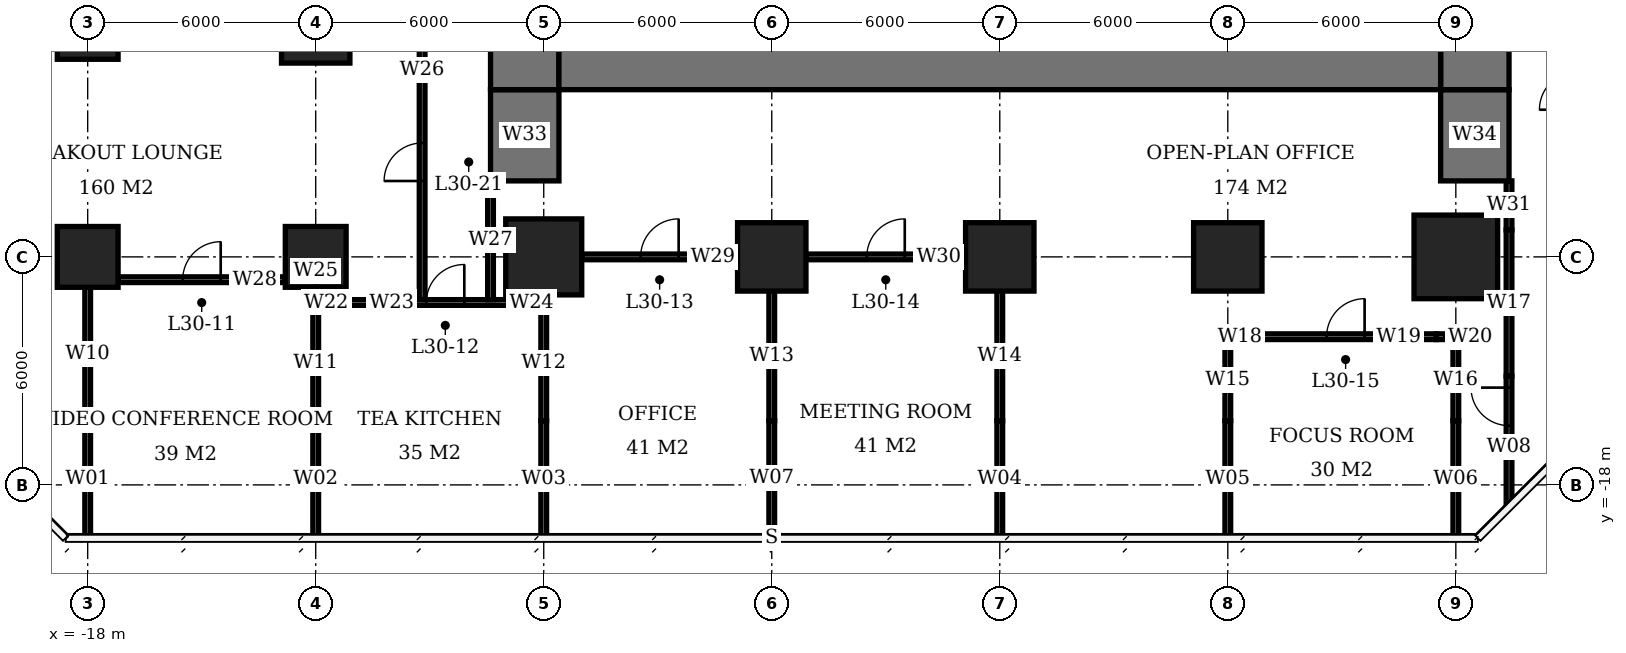
"""IFC4 building model, lengths in metres.
Left out: names, types, materials, properties, quantities, classifications, styles, units other than length and angle.
Written with IfcOpenShell. Run it as: python <this file> out.ifc"""

import sys

from ifc_helpers import new_model, si_unit, direction, frame, frame_2d, origin, origin_2d, place, context, subcontext, project, spatial, rectangle, extrude, element, fill, save


model = new_model("IFC4")
c1 = context("Model", 3, precision=1e-05, world=origin(), true_north=direction((0.0, 1.0)))
c2 = subcontext(c1, "Body", "Model", "MODEL_VIEW")
j1 = project(units=[si_unit("LENGTHUNIT", "METRE"), si_unit("PLANEANGLEUNIT", "RADIAN")], contexts=[c1])
p1 = place(None, origin())
s1 = spatial("IfcSite", under=j1, at=p1, CompositionType="ELEMENT")
p2 = place(p1, origin())
s2 = spatial("IfcBuilding", under=s1, at=p2, CompositionType="ELEMENT")
p3 = place(p2, frame((0.0, 0.0, 125.0)))
s3 = spatial("IfcBuildingStorey", under=s2, at=p3, CompositionType="ELEMENT", Elevation=125.0)
for number, where, z_axis, x_axis in (
    (1, (-18.0, -12.0, 0.0), (0.0, 0.0, 1.0), (1.0, 0.0, 0.0)),
    (2, (-18.0, -6.0, 0.0), (0.0, 0.0, 1.0), (1.0, 0.0, 0.0)),
    (3, (-12.0, -12.0, 0.0), (0.0, 0.0, 1.0), (1.0, 0.0, 0.0)),
):
    element("IfcColumn", number, at=place(p3, frame(where, z_axis=z_axis, x_axis=x_axis)), inside=s3, PredefinedType="COLUMN", context=c2, shape_type="SweptSolid", body=[
        extrude(rectangle(XDim=1.6, YDim=1.6, at=origin_2d()), origin(), (0.0, 0.0, 1.0), 3.9),
    ])
p4 = place(p3, frame((-12.0, -6.0, 0.0), z_axis=(0.0, 0.0, 1.0), x_axis=(1.0, 0.0, 0.0)))
e4 = element("IfcColumn", 4, at=p4, inside=s3, PredefinedType="COLUMN", context=c2, shape_type="SweptSolid", body=[
    extrude(rectangle(XDim=1.8, YDim=1.8, at=origin_2d()), origin(), (0.0, 0.0, 1.0), 3.9),
])
p5 = place(p3, frame((-6.0, -12.0, 0.0), z_axis=(0.0, 0.0, 1.0), x_axis=(1.0, 0.0, 0.0)))
e5 = element("IfcColumn", 5, at=p5, inside=s3, PredefinedType="COLUMN", context=c2, shape_type="SweptSolid", body=[
    extrude(rectangle(XDim=2.0, YDim=2.0, at=origin_2d()), origin(), (0.0, 0.0, 1.0), 3.9),
])
for number, where, z_axis, x_axis in (
    (6, (0.0, -12.0, 0.0), (0.0, 0.0, 1.0), (1.0, 0.0, 0.0)),
    (7, (6.0, -12.0, 0.0), (0.0, 0.0, 1.0), (1.0, 0.0, 0.0)),
    (8, (12.0, -12.0, 0.0), (0.0, 0.0, 1.0), (1.0, 0.0, 0.0)),
):
    element("IfcColumn", number, at=place(p3, frame(where, z_axis=z_axis, x_axis=x_axis)), inside=s3, PredefinedType="COLUMN", context=c2, shape_type="SweptSolid", body=[
        extrude(rectangle(XDim=1.8, YDim=1.8, at=origin_2d()), origin(), (0.0, 0.0, 1.0), 3.9),
    ])
p6 = place(p3, frame((18.0, -12.0, 0.0), z_axis=(0.0, 0.0, 1.0), x_axis=(1.0, 0.0, 0.0)))
e9 = element("IfcColumn", 9, at=p6, inside=s3, PredefinedType="COLUMN", context=c2, shape_type="SweptSolid", body=[
    extrude(rectangle(XDim=2.2, YDim=2.2, at=origin_2d()), origin(), (0.0, 0.0, 1.0), 3.9),
])
p7 = place(p3, frame((-5.6, -6.6, 0.0), z_axis=(0.0, 0.0, 1.0), x_axis=(1.0, 0.0, 0.0)))
e10 = element("IfcWall", 10, at=p7, inside=s3, PredefinedType="SHEAR", context=c2, shape_type="SweptSolid", body=[
    extrude(rectangle(XDim=23.2, YDim=2.0, at=frame_2d((11.6, 0.0))), origin(), (0.0, 0.0, 1.0), 3.9),
])
p8 = place(p3, frame((-6.5, -7.6, 0.0), z_axis=(0.0, 0.0, 1.0), x_axis=(0.0, 1.0, 0.0)))
e11 = element("IfcWall", 11, at=p8, inside=s3, PredefinedType="SHEAR", context=c2, shape_type="SweptSolid", body=[
    extrude(rectangle(XDim=21.2, YDim=1.8, at=frame_2d((10.6, 0.0))), origin(), (0.0, 0.0, 1.0), 3.9),
])
p9 = place(p8, frame((7.8, 0.0, 0.0)))
e12 = element("IfcOpeningElement", 12, at=p9, cuts=e11, PredefinedType="OPENING", context=c2, shape_type="SweptSolid", body=[
    extrude(rectangle(XDim=1.8, YDim=2.4, at=frame_2d((0.9, 1.2))), frame((0.0, 0.91, 0.0), z_axis=(0.0, -1.0, 0.0), x_axis=(1.0, 0.0, 0.0)), (0.0, 0.0, 1.0), 1.82),
])
p10 = place(p3, frame((18.5, -7.6, 0.0), z_axis=(0.0, 0.0, 1.0), x_axis=(0.0, 1.0, 0.0)))
e13 = element("IfcWall", 13, at=p10, inside=s3, PredefinedType="SHEAR", context=c2, shape_type="SweptSolid", body=[
    extrude(rectangle(XDim=21.2, YDim=1.8, at=frame_2d((10.6, 0.0))), origin(), (0.0, 0.0, 1.0), 3.9),
])
p11 = place(p10, frame((9.2, 0.0, 0.0)))
e14 = element("IfcOpeningElement", 14, at=p11, cuts=e13, PredefinedType="OPENING", context=c2, shape_type="SweptSolid", body=[
    extrude(rectangle(XDim=1.8, YDim=2.4, at=frame_2d((0.9, 1.2))), frame((0.0, 0.91, 0.0), z_axis=(0.0, -1.0, 0.0), x_axis=(1.0, 0.0, 0.0)), (0.0, 0.0, 1.0), 1.82),
])
for number, where, z_axis, x_axis in (
    (15, (-6.5, -10.0, 0.0), (0.0, 0.0, 1.0), (0.0, 1.0, 0.0)),
    (16, (18.5, -10.0, 0.0), (0.0, 0.0, 1.0), (0.0, 1.0, 0.0)),
):
    element("IfcWall", number, at=place(p3, frame(where, z_axis=z_axis, x_axis=x_axis)), inside=s3, PredefinedType="SHEAR", context=c2, shape_type="SweptSolid", body=[
        extrude(rectangle(XDim=2.4, YDim=1.8, at=frame_2d((1.2, 0.0))), origin(), (0.0, 0.0, 1.0), 3.9),
    ])
p12 = place(p3, frame((11.925, -14.1, 0.0), z_axis=(0.0, 0.0, 1.0), x_axis=(1.0, 0.0, 0.0)))
e17 = element("IfcWall", 17, at=p12, inside=s3, PredefinedType="PARTITIONING", context=c2, shape_type="SweptSolid", body=[
    extrude(rectangle(XDim=0.785, YDim=0.15, at=frame_2d((0.393, 0.0))), origin(), (0.0, 0.0, 1.0), 2.65),
])
p13 = place(p3, frame((12.71, -14.1, 0.0), z_axis=(0.0, 0.0, 1.0), x_axis=(1.0, 0.0, 0.0)))
e18 = element("IfcWall", 18, at=p13, inside=s3, PredefinedType="PARTITIONING", context=c2, shape_type="SweptSolid", body=[
    extrude(rectangle(XDim=4.78, YDim=0.15, at=frame_2d((2.39, 0.0))), origin(), (0.0, 0.0, 1.0), 3.65),
])
p14 = place(p13, frame((1.89, 0.0, 0.0)))
e19 = element("IfcOpeningElement", 19, at=p14, cuts=e18, PredefinedType="OPENING", context=c2, shape_type="SweptSolid", body=[
    extrude(rectangle(XDim=1.0, YDim=2.1, at=frame_2d((0.5, 1.05))), frame((0.0, 0.085, 0.0), z_axis=(0.0, -1.0, 0.0), x_axis=(1.0, 0.0, 0.0)), (0.0, 0.0, 1.0), 0.17),
])
p15 = place(p3, frame((17.49, -14.1, 0.0), z_axis=(0.0, 0.0, 1.0), x_axis=(1.0, 0.0, 0.0)))
e20 = element("IfcWall", 20, at=p15, inside=s3, PredefinedType="PARTITIONING", context=c2, shape_type="SweptSolid", body=[
    extrude(rectangle(XDim=0.585, YDim=0.15, at=frame_2d((0.292, 0.0))), origin(), (0.0, 0.0, 1.0), 2.65),
])
p16 = place(p3, frame((-12.15, -13.2, 0.0), z_axis=(0.0, 0.0, 1.0), x_axis=(1.0, 0.0, 0.0)))
e21 = element("IfcWall", 21, at=p16, inside=s3, PredefinedType="PARTITIONING", context=c2, shape_type="SweptSolid", body=[
    extrude(rectangle(XDim=0.86, YDim=0.15, at=frame_2d((0.43, 0.0))), origin(), (0.0, 0.0, 1.0), 2.65),
])
p17 = place(p3, frame((-11.29, -13.2, 0.0), z_axis=(0.0, 0.0, 1.0), x_axis=(1.0, 0.0, 0.0)))
e22 = element("IfcWall", 22, at=p17, inside=s3, PredefinedType="PARTITIONING", context=c2, shape_type="SweptSolid", body=[
    extrude(rectangle(XDim=4.58, YDim=0.15, at=frame_2d((2.29, 0.0))), origin(), (0.0, 0.0, 1.0), 3.65),
])
p18 = place(p17, frame((2.2, 0.0, 0.0)))
e23 = element("IfcOpeningElement", 23, at=p18, cuts=e22, PredefinedType="OPENING", context=c2, shape_type="SweptSolid", body=[
    extrude(rectangle(XDim=1.0, YDim=2.1, at=frame_2d((0.5, 1.05))), frame((0.0, 0.085, 0.0), z_axis=(0.0, -1.0, 0.0), x_axis=(1.0, 0.0, 0.0)), (0.0, 0.0, 1.0), 0.17),
])
p19 = place(p3, frame((-6.71, -13.2, 0.0), z_axis=(0.0, 0.0, 1.0), x_axis=(1.0, 0.0, 0.0)))
e24 = element("IfcWall", 24, at=p19, inside=s3, PredefinedType="PARTITIONING", context=c2, shape_type="SweptSolid", body=[
    extrude(rectangle(XDim=0.785, YDim=0.15, at=frame_2d((0.393, 0.0))), origin(), (0.0, 0.0, 1.0), 2.65),
])
p20 = place(p3, frame((-17.2, -12.6, 0.0), z_axis=(0.0, 0.0, 1.0), x_axis=(1.0, 0.0, 0.0)))
e25 = element("IfcWall", 25, at=p20, inside=s3, PredefinedType="PARTITIONING", context=c2, shape_type="SweptSolid", body=[
    extrude(rectangle(XDim=4.4, YDim=0.15, at=frame_2d((2.2, 0.0))), origin(), (0.0, 0.0, 1.0), 3.65),
])
p21 = place(p20, frame((1.7, 0.0, 0.0)))
e26 = element("IfcOpeningElement", 26, at=p21, cuts=e25, PredefinedType="OPENING", context=c2, shape_type="SweptSolid", body=[
    extrude(rectangle(XDim=1.0, YDim=2.1, at=frame_2d((0.5, 1.05))), frame((0.0, 0.085, 0.0), z_axis=(0.0, -1.0, 0.0), x_axis=(1.0, 0.0, 0.0)), (0.0, 0.0, 1.0), 0.17),
])
p22 = place(p3, frame((-5.0, -12.0, 0.0), z_axis=(0.0, 0.0, 1.0), x_axis=(1.0, 0.0, 0.0)))
e27 = element("IfcWall", 27, at=p22, inside=s3, PredefinedType="PARTITIONING", context=c2, shape_type="SweptSolid", body=[
    extrude(rectangle(XDim=4.1, YDim=0.15, at=frame_2d((2.05, 0.0))), origin(), (0.0, 0.0, 1.0), 3.65),
])
p23 = place(p22, frame((1.55, 0.0, 0.0)))
e28 = element("IfcOpeningElement", 28, at=p23, cuts=e27, PredefinedType="OPENING", context=c2, shape_type="SweptSolid", body=[
    extrude(rectangle(XDim=1.0, YDim=2.1, at=frame_2d((0.5, 1.05))), frame((0.0, 0.085, 0.0), z_axis=(0.0, -1.0, 0.0), x_axis=(1.0, 0.0, 0.0)), (0.0, 0.0, 1.0), 0.17),
])
p24 = place(p3, frame((0.9, -12.0, 0.0), z_axis=(0.0, 0.0, 1.0), x_axis=(1.0, 0.0, 0.0)))
e29 = element("IfcWall", 29, at=p24, inside=s3, PredefinedType="PARTITIONING", context=c2, shape_type="SweptSolid", body=[
    extrude(rectangle(XDim=4.2, YDim=0.15, at=frame_2d((2.1, 0.0))), origin(), (0.0, 0.0, 1.0), 3.65),
])
p25 = place(p24, frame((1.6, 0.0, 0.0)))
e30 = element("IfcOpeningElement", 30, at=p25, cuts=e29, PredefinedType="OPENING", context=c2, shape_type="SweptSolid", body=[
    extrude(rectangle(XDim=1.0, YDim=2.1, at=frame_2d((0.5, 1.05))), frame((0.0, 0.085, 0.0), z_axis=(0.0, -1.0, 0.0), x_axis=(1.0, 0.0, 0.0)), (0.0, 0.0, 1.0), 0.17),
])
p26 = place(p3, frame((-18.0, -19.4, 0.0), z_axis=(0.0, 0.0, 1.0), x_axis=(0.0, 1.0, 0.0)))
e31 = element("IfcWall", 31, at=p26, inside=s3, PredefinedType="PARTITIONING", context=c2, shape_type="SweptSolid", body=[
    extrude(rectangle(XDim=3.09, YDim=0.15, at=frame_2d((1.545, 0.0))), origin(), (0.0, 0.0, 1.0), 3.65),
])
p27 = place(p3, frame((-18.0, -16.31, 0.0), z_axis=(0.0, 0.0, 1.0), x_axis=(0.0, 1.0, 0.0)))
e32 = element("IfcWall", 32, at=p27, inside=s3, PredefinedType="PARTITIONING", context=c2, shape_type="SweptSolid", body=[
    extrude(rectangle(XDim=3.51, YDim=0.15, at=frame_2d((1.755, 0.0))), origin(), (0.0, 0.0, 1.0), 2.65),
])
p28 = place(p3, frame((-12.0, -19.4, 0.0), z_axis=(0.0, 0.0, 1.0), x_axis=(0.0, 1.0, 0.0)))
e33 = element("IfcWall", 33, at=p28, inside=s3, PredefinedType="PARTITIONING", context=c2, shape_type="SweptSolid", body=[
    extrude(rectangle(XDim=3.09, YDim=0.15, at=frame_2d((1.545, 0.0))), origin(), (0.0, 0.0, 1.0), 3.65),
])
p29 = place(p3, frame((-12.0, -16.31, 0.0), z_axis=(0.0, 0.0, 1.0), x_axis=(0.0, 1.0, 0.0)))
e34 = element("IfcWall", 34, at=p29, inside=s3, PredefinedType="PARTITIONING", context=c2, shape_type="SweptSolid", body=[
    extrude(rectangle(XDim=3.035, YDim=0.15, at=frame_2d((1.518, 0.0))), origin(), (0.0, 0.0, 1.0), 2.65),
])
p30 = place(p3, frame((-12.0, -13.125, 0.0), z_axis=(0.0, 0.0, 1.0), x_axis=(0.0, 1.0, 0.0)))
e35 = element("IfcWall", 35, at=p30, inside=s3, PredefinedType="PARTITIONING", context=c2, shape_type="SweptSolid", body=[
    extrude(rectangle(XDim=0.325, YDim=0.15, at=frame_2d((0.163, 0.0))), origin(), (0.0, 0.0, 1.0), 2.65),
])
p31 = place(p3, frame((-6.0, -19.4, 0.0), z_axis=(0.0, 0.0, 1.0), x_axis=(0.0, 1.0, 0.0)))
e36 = element("IfcWall", 36, at=p31, inside=s3, PredefinedType="PARTITIONING", context=c2, shape_type="SweptSolid", body=[
    extrude(rectangle(XDim=3.09, YDim=0.15, at=frame_2d((1.545, 0.0))), origin(), (0.0, 0.0, 1.0), 3.65),
])
p32 = place(p3, frame((-6.0, -16.31, 0.0), z_axis=(0.0, 0.0, 1.0), x_axis=(0.0, 1.0, 0.0)))
e37 = element("IfcWall", 37, at=p32, inside=s3, PredefinedType="PARTITIONING", context=c2, shape_type="SweptSolid", body=[
    extrude(rectangle(XDim=3.035, YDim=0.15, at=frame_2d((1.518, 0.0))), origin(), (0.0, 0.0, 1.0), 2.65),
])
p33 = place(p3, frame((0.0, -19.35, 0.0), z_axis=(0.0, 0.0, 1.0), x_axis=(0.0, 1.0, 0.0)))
e38 = element("IfcWall", 38, at=p33, inside=s3, PredefinedType="PARTITIONING", context=c2, shape_type="SweptSolid", body=[
    extrude(rectangle(XDim=3.04, YDim=0.15, at=frame_2d((1.52, 0.0))), origin(), (0.0, 0.0, 1.0), 3.65),
])
p34 = place(p3, frame((0.0, -16.31, 0.0), z_axis=(0.0, 0.0, 1.0), x_axis=(0.0, 1.0, 0.0)))
e39 = element("IfcWall", 39, at=p34, inside=s3, PredefinedType="PARTITIONING", context=c2, shape_type="SweptSolid", body=[
    extrude(rectangle(XDim=3.41, YDim=0.15, at=frame_2d((1.705, 0.0))), origin(), (0.0, 0.0, 1.0), 2.65),
])
p35 = place(p3, frame((6.0, -19.4, 0.0), z_axis=(0.0, 0.0, 1.0), x_axis=(0.0, 1.0, 0.0)))
e40 = element("IfcWall", 40, at=p35, inside=s3, PredefinedType="PARTITIONING", context=c2, shape_type="SweptSolid", body=[
    extrude(rectangle(XDim=3.09, YDim=0.15, at=frame_2d((1.545, 0.0))), origin(), (0.0, 0.0, 1.0), 3.65),
])
p36 = place(p3, frame((6.0, -16.31, 0.0), z_axis=(0.0, 0.0, 1.0), x_axis=(0.0, 1.0, 0.0)))
e41 = element("IfcWall", 41, at=p36, inside=s3, PredefinedType="PARTITIONING", context=c2, shape_type="SweptSolid", body=[
    extrude(rectangle(XDim=3.41, YDim=0.15, at=frame_2d((1.705, 0.0))), origin(), (0.0, 0.0, 1.0), 2.65),
])
p37 = place(p3, frame((12.0, -19.4, 0.0), z_axis=(0.0, 0.0, 1.0), x_axis=(0.0, 1.0, 0.0)))
e42 = element("IfcWall", 42, at=p37, inside=s3, PredefinedType="PARTITIONING", context=c2, shape_type="SweptSolid", body=[
    extrude(rectangle(XDim=3.09, YDim=0.15, at=frame_2d((1.545, 0.0))), origin(), (0.0, 0.0, 1.0), 3.65),
])
p38 = place(p3, frame((12.0, -16.31, 0.0), z_axis=(0.0, 0.0, 1.0), x_axis=(0.0, 1.0, 0.0)))
e43 = element("IfcWall", 43, at=p38, inside=s3, PredefinedType="PARTITIONING", context=c2, shape_type="SweptSolid", body=[
    extrude(rectangle(XDim=2.135, YDim=0.15, at=frame_2d((1.067, 0.0))), origin(), (0.0, 0.0, 1.0), 2.65),
])
p39 = place(p3, frame((18.0, -19.4, 0.0), z_axis=(0.0, 0.0, 1.0), x_axis=(0.0, 1.0, 0.0)))
e44 = element("IfcWall", 44, at=p39, inside=s3, PredefinedType="PARTITIONING", context=c2, shape_type="SweptSolid", body=[
    extrude(rectangle(XDim=3.09, YDim=0.15, at=frame_2d((1.545, 0.0))), origin(), (0.0, 0.0, 1.0), 3.65),
])
p40 = place(p3, frame((18.0, -16.31, 0.0), z_axis=(0.0, 0.0, 1.0), x_axis=(0.0, 1.0, 0.0)))
e45 = element("IfcWall", 45, at=p40, inside=s3, PredefinedType="PARTITIONING", context=c2, shape_type="SweptSolid", body=[
    extrude(rectangle(XDim=2.135, YDim=0.15, at=frame_2d((1.067, 0.0))), origin(), (0.0, 0.0, 1.0), 2.65),
])
p41 = place(p3, frame((-9.2, -13.125, 0.0), z_axis=(0.0, 0.0, 1.0), x_axis=(0.0, 1.0, 0.0)))
e46 = element("IfcWall", 46, at=p41, inside=s3, PredefinedType="PARTITIONING", context=c2, shape_type="SweptSolid", body=[
    extrude(rectangle(XDim=12.075, YDim=0.15, at=frame_2d((6.038, 0.0))), origin(), (0.0, 0.0, 1.0), 3.65),
])
p42 = place(p41, frame((3.122, 0.0, 0.0)))
e47 = element("IfcOpeningElement", 47, at=p42, cuts=e46, PredefinedType="OPENING", context=c2, shape_type="SweptSolid", body=[
    extrude(rectangle(XDim=1.0, YDim=2.1, at=frame_2d((0.5, 1.05))), frame((0.0, 0.085, 0.0), z_axis=(0.0, -1.0, 0.0), x_axis=(1.0, 0.0, 0.0)), (0.0, 0.0, 1.0), 0.17),
])
p43 = place(p3, frame((-7.4, -13.125, 0.0), z_axis=(0.0, 0.0, 1.0), x_axis=(0.0, 1.0, 0.0)))
e48 = element("IfcWall", 48, at=p43, inside=s3, PredefinedType="PARTITIONING", context=c2, shape_type="SweptSolid", body=[
    extrude(rectangle(XDim=3.125, YDim=0.15, at=frame_2d((1.562, 0.0))), origin(), (0.0, 0.0, 1.0), 3.65),
])
p44 = place(p3, frame((19.4, -18.489, 0.0), z_axis=(0.0, 0.0, 1.0), x_axis=(0.0, 1.0, 0.0)))
e49 = element("IfcWall", 49, at=p44, inside=s3, PredefinedType="PARTITIONING", context=c2, shape_type="SweptSolid", body=[
    extrude(rectangle(XDim=3.349, YDim=0.15, at=frame_2d((1.675, 0.0))), origin(), (0.0, 0.0, 1.0), 3.65),
])
p45 = place(p44, frame((2.049, 0.0, 0.0)))
e50 = element("IfcOpeningElement", 50, at=p45, cuts=e49, PredefinedType="OPENING", context=c2, shape_type="SweptSolid", body=[
    extrude(rectangle(XDim=1.0, YDim=2.1, at=frame_2d((0.5, 1.05))), frame((0.0, 0.085, 0.0), z_axis=(0.0, -1.0, 0.0), x_axis=(1.0, 0.0, 0.0)), (0.0, 0.0, 1.0), 0.17),
])
p46 = place(p3, frame((19.4, -15.14, 0.0), z_axis=(0.0, 0.0, 1.0), x_axis=(0.0, 1.0, 0.0)))
e51 = element("IfcWall", 51, at=p46, inside=s3, PredefinedType="PARTITIONING", context=c2, shape_type="SweptSolid", body=[
    extrude(rectangle(XDim=3.85, YDim=0.15, at=frame_2d((1.925, 0.0))), origin(), (0.0, 0.0, 1.0), 2.65),
])
p47 = place(p3, frame((19.4, -11.29, 0.0), z_axis=(0.0, 0.0, 1.0), x_axis=(0.0, 1.0, 0.0)))
e52 = element("IfcWall", 52, at=p47, inside=s3, PredefinedType="PARTITIONING", context=c2, shape_type="SweptSolid", body=[
    extrude(rectangle(XDim=1.29, YDim=0.15, at=frame_2d((0.645, 0.0))), origin(), (0.0, 0.0, 1.0), 3.65),
])
p48 = place(p21, origin())
e53 = element("IfcDoor", 53, at=p48, inside=s3, OperationType="SINGLE_SWING_RIGHT", PredefinedType="DOOR", context=c2, shape_type="SweptSolid", body=[
    extrude(rectangle(XDim=1.0, YDim=2.1, at=frame_2d((0.5, 1.05))), frame((0.0, 0.025, 0.0), z_axis=(0.0, -1.0, 0.0), x_axis=(1.0, 0.0, 0.0)), (0.0, 0.0, 1.0), 0.05),
])
fill(e26, e53)
p49 = place(p18, origin())
e54 = element("IfcDoor", 54, at=p49, inside=s3, OperationType="SINGLE_SWING_RIGHT", PredefinedType="DOOR", context=c2, shape_type="SweptSolid", body=[
    extrude(rectangle(XDim=1.0, YDim=2.1, at=frame_2d((0.5, 1.05))), frame((0.0, 0.025, 0.0), z_axis=(0.0, -1.0, 0.0), x_axis=(1.0, 0.0, 0.0)), (0.0, 0.0, 1.0), 0.05),
])
fill(e23, e54)
p50 = place(p23, origin())
e55 = element("IfcDoor", 55, at=p50, inside=s3, OperationType="SINGLE_SWING_RIGHT", PredefinedType="DOOR", context=c2, shape_type="SweptSolid", body=[
    extrude(rectangle(XDim=1.0, YDim=2.1, at=frame_2d((0.5, 1.05))), frame((0.0, 0.025, 0.0), z_axis=(0.0, -1.0, 0.0), x_axis=(1.0, 0.0, 0.0)), (0.0, 0.0, 1.0), 0.05),
])
fill(e28, e55)
p51 = place(p25, origin())
e56 = element("IfcDoor", 56, at=p51, inside=s3, OperationType="SINGLE_SWING_RIGHT", PredefinedType="DOOR", context=c2, shape_type="SweptSolid", body=[
    extrude(rectangle(XDim=1.0, YDim=2.1, at=frame_2d((0.5, 1.05))), frame((0.0, 0.025, 0.0), z_axis=(0.0, -1.0, 0.0), x_axis=(1.0, 0.0, 0.0)), (0.0, 0.0, 1.0), 0.05),
])
fill(e30, e56)
p52 = place(p14, origin())
e57 = element("IfcDoor", 57, at=p52, inside=s3, OperationType="SINGLE_SWING_RIGHT", PredefinedType="DOOR", context=c2, shape_type="SweptSolid", body=[
    extrude(rectangle(XDim=1.0, YDim=2.1, at=frame_2d((0.5, 1.05))), frame((0.0, 0.025, 0.0), z_axis=(0.0, -1.0, 0.0), x_axis=(1.0, 0.0, 0.0)), (0.0, 0.0, 1.0), 0.05),
])
fill(e19, e57)
p53 = place(p45, origin())
e58 = element("IfcDoor", 58, at=p53, inside=s3, OperationType="SINGLE_SWING_RIGHT", PredefinedType="DOOR", context=c2, shape_type="SweptSolid", body=[
    extrude(rectangle(XDim=1.0, YDim=2.1, at=frame_2d((0.5, 1.05))), frame((0.0, 0.025, 0.0), z_axis=(0.0, -1.0, 0.0), x_axis=(1.0, 0.0, 0.0)), (0.0, 0.0, 1.0), 0.05),
])
fill(e50, e58)
p54 = place(p42, origin())
e59 = element("IfcDoor", 59, at=p54, inside=s3, OperationType="SINGLE_SWING_LEFT", PredefinedType="DOOR", context=c2, shape_type="SweptSolid", body=[
    extrude(rectangle(XDim=1.0, YDim=2.1, at=frame_2d((0.5, 1.05))), frame((0.0, 0.025, 0.0), z_axis=(0.0, -1.0, 0.0), x_axis=(1.0, 0.0, 0.0)), (0.0, 0.0, 1.0), 0.05),
])
fill(e47, e59)
save(model, sys.argv[1])
